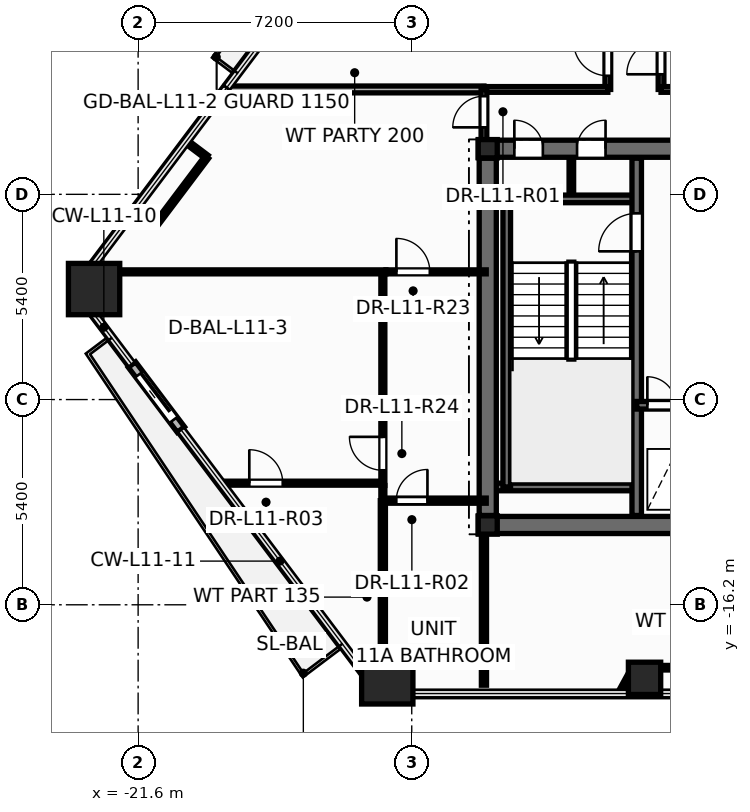
"""IFC4 building model, lengths in metres.
Left out: names, types, materials, properties, quantities, classifications, styles, units other than length and angle.
Written with IfcOpenShell. Run it as: python <this file> out.ifc"""

import sys

from ifc_helpers import new_model, si_unit, direction, frame, frame_2d, origin, origin_2d, place, context, subcontext, project, spatial, rectangle, hollow_rectangle, hollow_circle, i_section, extrude, element, fill, save


model = new_model("IFC4")
c1 = context("Model", 3, precision=1e-05, world=origin(), true_north=direction((0.0, 1.0)))
c2 = subcontext(c1, "Body", "Model", "MODEL_VIEW")
j1 = project(units=[si_unit("LENGTHUNIT", "METRE"), si_unit("PLANEANGLEUNIT", "RADIAN")], contexts=[c1])
p1 = place(None, origin())
s1 = spatial("IfcSite", under=j1, at=p1, CompositionType="ELEMENT")
p2 = place(p1, origin())
s2 = spatial("IfcBuilding", under=s1, at=p2, CompositionType="ELEMENT")
p3 = place(p2, frame((0.0, 0.0, 45.9)))
s3 = spatial("IfcBuildingStorey", under=s2, at=p3, CompositionType="ELEMENT", Elevation=45.9)
for number, where, z_axis, x_axis in (
    (1, (-22.759, -7.892, 0.0), (0.0, 0.0, 1.0), (1.0, 0.0, 0.0)),
    (2, (-15.044, -18.135, 0.0), (0.0, 0.0, 1.0), (1.0, 0.0, 0.0)),
):
    element("IfcColumn", number, at=place(p3, frame(where, z_axis=z_axis, x_axis=x_axis)), inside=s3, PredefinedType="COLUMN", context=c2, shape_type="SweptSolid", body=[
        extrude(hollow_rectangle(XDim=1.35, YDim=1.35, WallThickness=0.065, at=origin_2d()), origin(), (0.0, 0.0, 1.0), 3.6),
    ])
p4 = place(p3, frame((-8.274, -18.135, 0.0), z_axis=(0.0, 0.0, 1.0), x_axis=(1.0, 0.0, 0.0)))
e3 = element("IfcColumn", 3, at=p4, inside=s3, PredefinedType="COLUMN", context=c2, shape_type="SweptSolid", body=[
    extrude(hollow_circle(Radius=0.425, WallThickness=0.038, at=origin_2d()), origin(), (0.0, 0.0, 1.0), 3.6),
])
for number, where, z_axis, x_axis in (
    (4, (-12.4, -14.1, 0.0), (0.0, 0.0, 1.0), (1.0, 0.0, 0.0)),
    (5, (-12.4, -4.2, 0.0), (0.0, 0.0, 1.0), (1.0, 0.0, 0.0)),
):
    element("IfcColumn", number, at=place(p3, frame(where, z_axis=z_axis, x_axis=x_axis)), inside=s3, PredefinedType="COLUMN", context=c2, shape_type="SweptSolid", body=[
        extrude(i_section(OverallWidth=0.5, OverallDepth=0.482, WebThickness=0.04, FlangeThickness=0.045, at=origin_2d()), origin(), (0.0, 0.0, 1.0), 3.6),
    ])
p5 = place(p3, frame((-21.763, -9.88, -0.015), z_axis=(0.0, 0.0, 1.0), x_axis=(0.601568650406, -0.79882110566, 0.0)))
e6 = element("IfcWall", 6, at=p5, inside=s3, PredefinedType="STANDARD", context=c2, shape_type="SweptSolid", body=[
    extrude(rectangle(XDim=2.14, YDim=0.24, at=frame_2d((1.07, 0.0))), origin(), (0.0, 0.0, 1.0), 2.728),
])
p6 = place(p5, frame((0.32, 0.0, 0.015)))
e7 = element("IfcOpeningElement", 7, at=p6, cuts=e6, PredefinedType="OPENING", context=c2, shape_type="SweptSolid", body=[
    extrude(rectangle(XDim=1.506, YDim=2.204, at=frame_2d((0.75, 1.102))), frame((0.0, 0.13, 0.0), z_axis=(0.0, -1.0, 0.0), x_axis=(1.0, 0.0, 0.0)), (0.0, 0.0, 1.0), 0.26),
])
p7 = place(p3, frame((-10.2, -5.52, 0.0), z_axis=(0.0, 0.0, 1.0), x_axis=(0.0, 1.0, 0.0)))
e8 = element("IfcWall", 8, at=p7, inside=s3, PredefinedType="PARTITIONING", context=c2, shape_type="SweptSolid", body=[
    extrude(rectangle(XDim=1.12, YDim=0.12, at=frame_2d((0.56, 0.0))), origin(), (0.0, 0.0, 1.0), 3.35),
])
p8 = place(p3, frame((-12.65, -14.1, 0.0), z_axis=(0.0, 0.0, 1.0), x_axis=(1.0, 0.0, 0.0)))
e9 = element("IfcWall", 9, at=p8, inside=s3, PredefinedType="SHEAR", context=c2, shape_type="SweptSolid", body=[
    extrude(rectangle(XDim=25.3, YDim=0.45, at=frame_2d((12.65, 0.0))), origin(), (0.0, 0.0, 1.0), 3.6),
])
p9 = place(p3, frame((-12.65, -4.2, 0.0), z_axis=(0.0, 0.0, 1.0), x_axis=(1.0, 0.0, 0.0)))
e10 = element("IfcWall", 10, at=p9, inside=s3, PredefinedType="SHEAR", context=c2, shape_type="SweptSolid", body=[
    extrude(rectangle(XDim=25.3, YDim=0.45, at=frame_2d((12.65, 0.0))), origin(), (0.0, 0.0, 1.0), 3.6),
])
p10 = place(p9, frame((0.95, 0.0, 0.0)))
e11 = element("IfcOpeningElement", 11, at=p10, cuts=e10, PredefinedType="OPENING", context=c2, shape_type="SweptSolid", body=[
    extrude(rectangle(XDim=0.756, YDim=2.054, at=frame_2d((0.375, 1.027))), frame((0.0, 0.235, 0.0), z_axis=(0.0, -1.0, 0.0), x_axis=(1.0, 0.0, 0.0)), (0.0, 0.0, 1.0), 0.47),
])
p11 = place(p9, frame((2.6, 0.0, 0.0)))
e12 = element("IfcOpeningElement", 12, at=p11, cuts=e10, PredefinedType="OPENING", context=c2, shape_type="SweptSolid", body=[
    extrude(rectangle(XDim=0.756, YDim=2.054, at=frame_2d((0.375, 1.027))), frame((0.0, 0.235, 0.0), z_axis=(0.0, -1.0, 0.0), x_axis=(1.0, 0.0, 0.0)), (0.0, 0.0, 1.0), 0.47),
])
p12 = place(p9, frame((21.85, 0.0, 0.0)))
e13 = element("IfcOpeningElement", 13, at=p12, cuts=e10, PredefinedType="OPENING", context=c2, shape_type="SweptSolid", body=[
    extrude(rectangle(XDim=0.756, YDim=2.054, at=frame_2d((0.375, 1.027))), frame((0.0, 0.235, 0.0), z_axis=(0.0, -1.0, 0.0), x_axis=(1.0, 0.0, 0.0)), (0.0, 0.0, 1.0), 0.47),
])
p13 = place(p9, frame((23.5, 0.0, 0.0)))
e14 = element("IfcOpeningElement", 14, at=p13, cuts=e10, PredefinedType="OPENING", context=c2, shape_type="SweptSolid", body=[
    extrude(rectangle(XDim=0.756, YDim=2.054, at=frame_2d((0.375, 1.027))), frame((0.0, 0.235, 0.0), z_axis=(0.0, -1.0, 0.0), x_axis=(1.0, 0.0, 0.0)), (0.0, 0.0, 1.0), 0.47),
])
p14 = place(p9, frame((5.85, 0.0, 0.0)))
e15 = element("IfcOpeningElement", 15, at=p14, cuts=e10, PredefinedType="OPENING", context=c2, shape_type="SweptSolid", body=[
    extrude(rectangle(XDim=1.006, YDim=2.104, at=frame_2d((0.5, 1.052))), frame((0.0, 0.235, 0.0), z_axis=(0.0, -1.0, 0.0), x_axis=(1.0, 0.0, 0.0)), (0.0, 0.0, 1.0), 0.47),
])
p15 = place(p9, frame((10.35, 0.0, 0.0)))
e16 = element("IfcOpeningElement", 16, at=p15, cuts=e10, PredefinedType="OPENING", context=c2, shape_type="SweptSolid", body=[
    extrude(rectangle(XDim=1.406, YDim=2.154, at=frame_2d((0.7, 1.077))), frame((0.0, 0.235, 0.0), z_axis=(0.0, -1.0, 0.0), x_axis=(1.0, 0.0, 0.0)), (0.0, 0.0, 1.0), 0.47),
])
p16 = place(p9, frame((18.45, 0.0, 0.0)))
e17 = element("IfcOpeningElement", 17, at=p16, cuts=e10, PredefinedType="OPENING", context=c2, shape_type="SweptSolid", body=[
    extrude(rectangle(XDim=1.006, YDim=2.104, at=frame_2d((0.5, 1.052))), frame((0.0, 0.235, 0.0), z_axis=(0.0, -1.0, 0.0), x_axis=(1.0, 0.0, 0.0)), (0.0, 0.0, 1.0), 0.47),
])
for number, where, z_axis, x_axis in (
    (18, (-12.35, -5.52, 0.0), (0.0, 0.0, 1.0), (1.0, 0.0, 0.0)),
    (19, (-12.35, -13.1, 0.0), (0.0, 0.0, 1.0), (1.0, 0.0, 0.0)),
):
    element("IfcWall", number, at=place(p3, frame(where, z_axis=z_axis, x_axis=x_axis)), inside=s3, PredefinedType="SOLIDWALL", context=c2, shape_type="SweptSolid", body=[
        extrude(rectangle(XDim=3.87, YDim=0.2, at=frame_2d((1.935, 0.0))), origin(), (0.0, 0.0, 1.0), 3.6),
    ])
p17 = place(p3, frame((-11.9, -13.1, 0.0), z_axis=(0.0, 0.0, 1.0), x_axis=(0.0, 1.0, 0.0)))
e20 = element("IfcWall", 20, at=p17, inside=s3, PredefinedType="SOLIDWALL", context=c2, shape_type="SweptSolid", body=[
    extrude(rectangle(XDim=7.58, YDim=0.2, at=frame_2d((3.79, 0.0))), origin(), (0.0, 0.0, 1.0), 3.6),
])
p18 = place(p3, frame((-8.48, -13.85, 0.0), z_axis=(0.0, 0.0, 1.0), x_axis=(0.0, 1.0, 0.0)))
e21 = element("IfcWall", 21, at=p18, inside=s3, PredefinedType="SHEAR", context=c2, shape_type="SweptSolid", body=[
    extrude(rectangle(XDim=9.4, YDim=0.25, at=frame_2d((4.7, 0.0))), origin(), (0.0, 0.0, 1.0), 3.6),
])
p19 = place(p18, frame((6.95, 0.0, 0.0)))
e22 = element("IfcOpeningElement", 22, at=p19, cuts=e21, PredefinedType="OPENING", context=c2, shape_type="SweptSolid", body=[
    extrude(rectangle(XDim=1.006, YDim=2.104, at=frame_2d((0.5, 1.052))), frame((0.0, 0.135, 0.0), z_axis=(0.0, -1.0, 0.0), x_axis=(1.0, 0.0, 0.0)), (0.0, 0.0, 1.0), 0.27),
])
p20 = place(p3, frame((-8.48, -10.95, 0.0), z_axis=(0.0, 0.0, 1.0), x_axis=(1.0, 0.0, 0.0)))
e23 = element("IfcWall", 23, at=p20, inside=s3, PredefinedType="SOLIDWALL", context=c2, shape_type="SweptSolid", body=[
    extrude(rectangle(XDim=3.36, YDim=0.2, at=frame_2d((1.68, 0.0))), origin(), (0.0, 0.0, 1.0), 3.6),
])
p21 = place(p20, frame((0.28, 0.0, 0.0)))
e24 = element("IfcOpeningElement", 24, at=p21, cuts=e23, PredefinedType="OPENING", context=c2, shape_type="SweptSolid", body=[
    extrude(rectangle(XDim=0.756, YDim=2.054, at=frame_2d((0.375, 1.027))), frame((0.0, 0.11, 0.0), z_axis=(0.0, -1.0, 0.0), x_axis=(1.0, 0.0, 0.0)), (0.0, 0.0, 1.0), 0.22),
])
p22 = place(p20, frame((1.85, 0.0, 0.0)))
e25 = element("IfcOpeningElement", 25, at=p22, cuts=e23, PredefinedType="OPENING", context=c2, shape_type="SweptSolid", body=[
    extrude(rectangle(XDim=1.106, YDim=2.104, at=frame_2d((0.55, 1.052))), frame((0.0, 0.11, 0.0), z_axis=(0.0, -1.0, 0.0), x_axis=(1.0, 0.0, 0.0)), (0.0, 0.0, 1.0), 0.22),
])
p23 = place(p3, frame((-12.4, -13.85, 0.0), z_axis=(0.0, 0.0, 1.0), x_axis=(0.0, 1.0, 0.0)))
e26 = element("IfcWall", 26, at=p23, inside=s3, PredefinedType="SHEAR", context=c2, shape_type="SweptSolid", body=[
    extrude(rectangle(XDim=9.4, YDim=0.45, at=frame_2d((4.7, 0.0))), origin(), (0.0, 0.0, 1.0), 3.6),
])
p24 = place(p3, frame((-9.24, -2.64, 0.0), z_axis=(0.0, 0.0, 1.0), x_axis=(0.0, 1.0, 0.0)))
e27 = element("IfcWall", 27, at=p24, inside=s3, PredefinedType="PARTITIONING", context=c2, shape_type="SweptSolid", body=[
    extrude(rectangle(XDim=8.84, YDim=0.15, at=frame_2d((4.42, 0.0))), origin(), (0.0, 0.0, 1.0), 2.509),
])
p25 = place(p24, frame((0.359, 0.0, 0.0)))
e28 = element("IfcOpeningElement", 28, at=p25, cuts=e27, PredefinedType="OPENING", context=c2, shape_type="SweptSolid", body=[
    extrude(rectangle(XDim=0.906, YDim=2.104, at=frame_2d((0.45, 1.052))), frame((0.0, 0.085, 0.0), z_axis=(0.0, -1.0, 0.0), x_axis=(1.0, 0.0, 0.0)), (0.0, 0.0, 1.0), 0.17),
])
p26 = place(p3, frame((-22.919, -7.44, 0.0), z_axis=(0.0, 0.0, 1.0), x_axis=(1.0, 0.0, 0.0)))
e29 = element("IfcWall", 29, at=p26, inside=s3, PredefinedType="PARTITIONING", context=c2, shape_type="SweptSolid", body=[
    extrude(rectangle(XDim=7.839, YDim=0.105, at=frame_2d((3.919, 0.0))), origin(), (0.0, 0.0, 1.0), 2.325),
])
p27 = place(p3, frame((-19.304, -2.64, 0.0), z_axis=(0.0, 0.0, 1.0), x_axis=(1.0, 0.0, 0.0)))
e30 = element("IfcWall", 30, at=p27, inside=s3, PredefinedType="PARTITIONING", context=c2, shape_type="SweptSolid", body=[
    extrude(rectangle(XDim=6.804, YDim=0.18, at=frame_2d((3.402, 0.0))), origin(), (0.0, 0.0, 1.0), 2.713),
])
p28 = place(p3, frame((-15.16, -13.06, 0.0), z_axis=(0.0, 0.0, 1.0), x_axis=(0.0, 1.0, 0.0)))
e31 = element("IfcWall", 31, at=p28, inside=s3, PredefinedType="PARTITIONING", context=c2, shape_type="SweptSolid", body=[
    extrude(rectangle(XDim=5.62, YDim=0.105, at=frame_2d((2.81, 0.0))), origin(), (0.0, 0.0, 1.0), 3.35),
])
p29 = place(p28, frame((0.399, 0.0, 0.0)))
e32 = element("IfcOpeningElement", 32, at=p29, cuts=e31, PredefinedType="OPENING", context=c2, shape_type="SweptSolid", body=[
    extrude(rectangle(XDim=0.886, YDim=2.104, at=frame_2d((0.44, 1.052))), frame((0.0, 0.062, 0.0), z_axis=(0.0, -1.0, 0.0), x_axis=(1.0, 0.0, 0.0)), (0.0, 0.0, 1.0), 0.125),
])
p30 = place(p3, frame((-15.16, -18.536, 0.0), z_axis=(0.0, 0.0, 1.0), x_axis=(0.0, 1.0, 0.0)))
e33 = element("IfcWall", 33, at=p30, inside=s3, PredefinedType="PARTITIONING", context=c2, shape_type="SweptSolid", body=[
    extrude(rectangle(XDim=5.076, YDim=0.135, at=frame_2d((2.538, 0.0))), origin(), (0.0, 0.0, 1.0), 2.713),
])
p31 = place(p3, frame((-7.84, -2.64, 0.0), z_axis=(0.0, 0.0, 1.0), x_axis=(0.0, 1.0, 0.0)))
e34 = element("IfcWall", 34, at=p31, inside=s3, PredefinedType="PARTITIONING", context=c2, shape_type="SweptSolid", body=[
    extrude(rectangle(XDim=4.84, YDim=0.15, at=frame_2d((2.42, 0.0))), origin(), (0.0, 0.0, 1.0), 2.509),
])
p32 = place(p31, frame((0.398, 0.0, 0.0)))
e35 = element("IfcOpeningElement", 35, at=p32, cuts=e34, PredefinedType="OPENING", context=c2, shape_type="SweptSolid", body=[
    extrude(rectangle(XDim=0.906, YDim=2.104, at=frame_2d((0.45, 1.052))), frame((0.0, 0.085, 0.0), z_axis=(0.0, -1.0, 0.0), x_axis=(1.0, 0.0, 0.0)), (0.0, 0.0, 1.0), 0.17),
])
p33 = place(p3, frame((-7.84, -2.64, 0.0), z_axis=(0.0, 0.0, 1.0), x_axis=(1.0, 0.0, 0.0)))
e36 = element("IfcWall", 36, at=p33, inside=s3, PredefinedType="PARTITIONING", context=c2, shape_type="SweptSolid", body=[
    extrude(rectangle(XDim=7.0, YDim=0.15, at=frame_2d((3.5, 0.0))), origin(), (0.0, 0.0, 1.0), 2.325),
])
p34 = place(p3, frame((-19.413, -13.0, 0.0), z_axis=(0.0, 0.0, 1.0), x_axis=(1.0, 0.0, 0.0)))
e37 = element("IfcWall", 37, at=p34, inside=s3, PredefinedType="PARTITIONING", context=c2, shape_type="SweptSolid", body=[
    extrude(rectangle(XDim=4.253, YDim=0.105, at=frame_2d((2.126, 0.0))), origin(), (0.0, 0.0, 1.0), 2.713),
])
p35 = place(p34, frame((0.739, 0.0, 0.0)))
e38 = element("IfcOpeningElement", 38, at=p35, cuts=e37, PredefinedType="OPENING", context=c2, shape_type="SweptSolid", body=[
    extrude(rectangle(XDim=0.886, YDim=2.104, at=frame_2d((0.44, 1.052))), frame((0.0, 0.062, 0.0), z_axis=(0.0, -1.0, 0.0), x_axis=(1.0, 0.0, 0.0)), (0.0, 0.0, 1.0), 0.125),
])
p36 = place(p3, frame((-8.556, -17.856, 0.0), z_axis=(0.0, 0.0, 1.0), x_axis=(1.0, 0.0, 0.0)))
e39 = element("IfcWall", 39, at=p36, inside=s3, PredefinedType="PARTITIONING", context=c2, shape_type="SweptSolid", body=[
    extrude(rectangle(XDim=3.411, YDim=0.12, at=frame_2d((1.706, 0.0))), origin(), (0.0, 0.0, 1.0), 2.713),
])
p37 = place(p3, frame((-12.5, -2.64, 0.0), z_axis=(0.0, 0.0, 1.0), x_axis=(1.0, 0.0, 0.0)))
e40 = element("IfcWall", 40, at=p37, inside=s3, PredefinedType="PARTITIONING", context=c2, shape_type="SweptSolid", body=[
    extrude(rectangle(XDim=3.26, YDim=0.15, at=frame_2d((1.63, 0.0))), origin(), (0.0, 0.0, 1.0), 3.35),
])
p38 = place(p3, frame((-15.078, -7.44, 0.0), z_axis=(0.0, 0.0, 1.0), x_axis=(1.0, 0.0, 0.0)))
e41 = element("IfcWall", 41, at=p38, inside=s3, PredefinedType="PARTITIONING", context=c2, shape_type="SweptSolid", body=[
    extrude(rectangle(XDim=2.638, YDim=0.105, at=frame_2d((1.319, 0.0))), origin(), (0.0, 0.0, 1.0), 2.713),
])
p39 = place(p38, frame((0.274, 0.0, 0.0)))
e42 = element("IfcOpeningElement", 42, at=p39, cuts=e41, PredefinedType="OPENING", context=c2, shape_type="SweptSolid", body=[
    extrude(rectangle(XDim=0.886, YDim=2.104, at=frame_2d((0.44, 1.052))), frame((0.0, 0.062, 0.0), z_axis=(0.0, -1.0, 0.0), x_axis=(1.0, 0.0, 0.0)), (0.0, 0.0, 1.0), 0.125),
])
p40 = place(p3, frame((-15.16, -13.46, 0.0), z_axis=(0.0, 0.0, 1.0), x_axis=(1.0, 0.0, 0.0)))
e43 = element("IfcWall", 43, at=p40, inside=s3, PredefinedType="PARTITIONING", context=c2, shape_type="SweptSolid", body=[
    extrude(rectangle(XDim=2.72, YDim=0.135, at=frame_2d((1.36, 0.0))), origin(), (0.0, 0.0, 1.0), 2.713),
])
p41 = place(p40, frame((0.353, 0.0, 0.0)))
e44 = element("IfcOpeningElement", 44, at=p41, cuts=e43, PredefinedType="OPENING", context=c2, shape_type="SweptSolid", body=[
    extrude(rectangle(XDim=0.826, YDim=2.104, at=frame_2d((0.41, 1.052))), frame((0.0, 0.078, 0.0), z_axis=(0.0, -1.0, 0.0), x_axis=(1.0, 0.0, 0.0)), (0.0, 0.0, 1.0), 0.155),
])
p42 = place(p3, frame((-19.793, -4.42, 0.0), z_axis=(0.0, 0.0, 1.0), x_axis=(-0.601604540601, -0.798794076548, 0.0)))
e45 = element("IfcWall", 45, at=p42, inside=s3, PredefinedType="PARTITIONING", context=c2, shape_type="SweptSolid", body=[
    extrude(rectangle(XDim=2.214, YDim=0.12, at=frame_2d((1.107, 0.0))), origin(), (0.0, 0.0, 1.0), 3.35),
])
p43 = place(p3, frame((-12.5, -4.24, 0.0), z_axis=(0.0, 0.0, 1.0), x_axis=(0.0, 1.0, 0.0)))
e46 = element("IfcWall", 46, at=p43, inside=s3, PredefinedType="PARTITIONING", context=c2, shape_type="SweptSolid", body=[
    extrude(rectangle(XDim=1.6, YDim=0.15, at=frame_2d((0.8, 0.0))), origin(), (0.0, 0.0, 1.0), 2.325),
])
p44 = place(p43, frame((0.602, 0.0, 0.0)))
e47 = element("IfcOpeningElement", 47, at=p44, cuts=e46, PredefinedType="OPENING", context=c2, shape_type="SweptSolid", body=[
    extrude(rectangle(XDim=0.826, YDim=2.104, at=frame_2d((0.41, 1.052))), frame((0.0, 0.085, 0.0), z_axis=(0.0, -1.0, 0.0), x_axis=(1.0, 0.0, 0.0)), (0.0, 0.0, 1.0), 0.17),
])
p45 = place(p3, frame((-21.125, -6.188, 0.0), z_axis=(0.0, 0.0, 1.0), x_axis=(-0.999744633781, -0.022597947373, 0.0)))
e48 = element("IfcWall", 48, at=p45, inside=s3, PredefinedType="PARTITIONING", context=c2, shape_type="SweptSolid", body=[
    extrude(rectangle(XDim=0.854, YDim=0.12, at=frame_2d((0.427, 0.0))), origin(), (0.0, 0.0, 1.0), 2.713),
])
p46 = place(p3, frame((-8.924, -18.526, 0.0), z_axis=(0.0, 0.0, 1.0), x_axis=(0.480888080126, 0.87678198795, 0.0)))
e49 = element("IfcWall", 49, at=p46, inside=s3, PredefinedType="PARTITIONING", context=c2, shape_type="SweptSolid", body=[
    extrude(rectangle(XDim=0.764, YDim=0.12, at=frame_2d((0.382, 0.0))), origin(), (0.0, 0.0, 1.0), 2.713),
])
p47 = place(p3, frame((-20.328, -4.017, 0.0), z_axis=(0.0, 0.0, 1.0), x_axis=(0.798949061571, -0.601398700544, 0.0)))
e50 = element("IfcWall", 50, at=p47, inside=s3, PredefinedType="PARTITIONING", context=c2, shape_type="SweptSolid", body=[
    extrude(rectangle(XDim=0.67, YDim=0.12, at=frame_2d((0.335, 0.0))), origin(), (0.0, 0.0, 1.0), 2.713),
])
p48 = place(p3, frame((-15.16, -13.46, 0.0), z_axis=(0.0, 0.0, 1.0), x_axis=(0.0, 1.0, 0.0)))
e51 = element("IfcWall", 51, at=p48, inside=s3, PredefinedType="PARTITIONING", context=c2, shape_type="SweptSolid", body=[
    extrude(rectangle(XDim=0.398, YDim=0.105, at=frame_2d((0.199, 0.0))), origin(), (0.0, 0.0, 1.0), 3.35),
])
p49 = place(p3, frame((-12.5, -14.4, 0.0), z_axis=(0.0, 0.0, 1.0), x_axis=(0.0, -1.0, 0.0)))
e52 = element("IfcWall", 52, at=p49, inside=s3, PredefinedType="PARTITIONING", context=c2, shape_type="SweptSolid", body=[
    extrude(rectangle(XDim=3.916, YDim=0.135, at=frame_2d((1.958, 0.0))), origin(), (0.0, 0.0, 1.0), 2.713),
])
p50 = place(p6, origin())
e53 = element("IfcDoor", 53, at=p50, inside=s3, OperationType="SLIDING_TO_RIGHT", PredefinedType="DOOR", context=c2, shape_type="SweptSolid", body=[
    extrude(rectangle(XDim=1.5, YDim=2.2, at=frame_2d((0.75, 1.1))), frame((0.0, 0.025, 0.0), z_axis=(0.0, -1.0, 0.0), x_axis=(1.0, 0.0, 0.0)), (0.0, 0.0, 1.0), 0.05),
])
fill(e7, e53)
p51 = place(p19, origin())
e54 = element("IfcDoor", 54, at=p51, inside=s3, OperationType="SINGLE_SWING_LEFT", PredefinedType="DOOR", context=c2, shape_type="SweptSolid", body=[
    extrude(rectangle(XDim=1.0, YDim=2.1, at=frame_2d((0.5, 1.05))), frame((0.0, 0.025, 0.0), z_axis=(0.0, -1.0, 0.0), x_axis=(1.0, 0.0, 0.0)), (0.0, 0.0, 1.0), 0.05),
])
fill(e22, e54)
p52 = place(p21, origin())
e55 = element("IfcDoor", 55, at=p52, inside=s3, OperationType="SINGLE_SWING_LEFT", PredefinedType="DOOR", context=c2, shape_type="SweptSolid", body=[
    extrude(rectangle(XDim=0.75, YDim=2.05, at=frame_2d((0.375, 1.025))), frame((0.0, 0.025, 0.0), z_axis=(0.0, -1.0, 0.0), x_axis=(1.0, 0.0, 0.0)), (0.0, 0.0, 1.0), 0.05),
])
fill(e24, e55)
p53 = place(p10, origin())
e56 = element("IfcDoor", 56, at=p53, inside=s3, OperationType="SINGLE_SWING_LEFT", PredefinedType="DOOR", context=c2, shape_type="SweptSolid", body=[
    extrude(rectangle(XDim=0.75, YDim=2.05, at=frame_2d((0.375, 1.025))), frame((0.0, 0.025, 0.0), z_axis=(0.0, -1.0, 0.0), x_axis=(1.0, 0.0, 0.0)), (0.0, 0.0, 1.0), 0.05),
])
fill(e11, e56)
p54 = place(p11, origin())
e57 = element("IfcDoor", 57, at=p54, inside=s3, OperationType="SINGLE_SWING_RIGHT", PredefinedType="DOOR", context=c2, shape_type="SweptSolid", body=[
    extrude(rectangle(XDim=0.75, YDim=2.05, at=frame_2d((0.375, 1.025))), frame((0.0, 0.025, 0.0), z_axis=(0.0, -1.0, 0.0), x_axis=(1.0, 0.0, 0.0)), (0.0, 0.0, 1.0), 0.05),
])
fill(e12, e57)
p55 = place(p44, origin())
e58 = element("IfcDoor", 58, at=p55, inside=s3, OperationType="SINGLE_SWING_LEFT", PredefinedType="DOOR", context=c2, shape_type="SweptSolid", body=[
    extrude(rectangle(XDim=0.82, YDim=2.1, at=frame_2d((0.41, 1.05))), frame((0.0, 0.025, 0.0), z_axis=(0.0, -1.0, 0.0), x_axis=(1.0, 0.0, 0.0)), (0.0, 0.0, 1.0), 0.05),
])
fill(e47, e58)
p56 = place(p41, origin())
e59 = element("IfcDoor", 59, at=p56, inside=s3, OperationType="SINGLE_SWING_RIGHT", PredefinedType="DOOR", context=c2, shape_type="SweptSolid", body=[
    extrude(rectangle(XDim=0.82, YDim=2.1, at=frame_2d((0.41, 1.05))), frame((0.0, 0.025, 0.0), z_axis=(0.0, -1.0, 0.0), x_axis=(1.0, 0.0, 0.0)), (0.0, 0.0, 1.0), 0.05),
])
fill(e44, e59)
p57 = place(p35, origin())
e60 = element("IfcDoor", 60, at=p57, inside=s3, OperationType="SINGLE_SWING_LEFT", PredefinedType="DOOR", context=c2, shape_type="SweptSolid", body=[
    extrude(rectangle(XDim=0.88, YDim=2.1, at=frame_2d((0.44, 1.05))), frame((0.0, 0.025, 0.0), z_axis=(0.0, -1.0, 0.0), x_axis=(1.0, 0.0, 0.0)), (0.0, 0.0, 1.0), 0.05),
])
fill(e38, e60)
p58 = place(p25, origin())
e61 = element("IfcDoor", 61, at=p58, inside=s3, OperationType="SINGLE_SWING_RIGHT", PredefinedType="DOOR", context=c2, shape_type="SweptSolid", body=[
    extrude(rectangle(XDim=0.9, YDim=2.1, at=frame_2d((0.45, 1.05))), frame((0.0, 0.025, 0.0), z_axis=(0.0, -1.0, 0.0), x_axis=(1.0, 0.0, 0.0)), (0.0, 0.0, 1.0), 0.05),
])
fill(e28, e61)
p59 = place(p32, origin())
e62 = element("IfcDoor", 62, at=p59, inside=s3, OperationType="SINGLE_SWING_LEFT", PredefinedType="DOOR", context=c2, shape_type="SweptSolid", body=[
    extrude(rectangle(XDim=0.9, YDim=2.1, at=frame_2d((0.45, 1.05))), frame((0.0, 0.025, 0.0), z_axis=(0.0, -1.0, 0.0), x_axis=(1.0, 0.0, 0.0)), (0.0, 0.0, 1.0), 0.05),
])
fill(e35, e62)
p60 = place(p39, origin())
e63 = element("IfcDoor", 63, at=p60, inside=s3, OperationType="SINGLE_SWING_LEFT", PredefinedType="DOOR", context=c2, shape_type="SweptSolid", body=[
    extrude(rectangle(XDim=0.88, YDim=2.1, at=frame_2d((0.44, 1.05))), frame((0.0, 0.025, 0.0), z_axis=(0.0, -1.0, 0.0), x_axis=(1.0, 0.0, 0.0)), (0.0, 0.0, 1.0), 0.05),
])
fill(e42, e63)
p61 = place(p29, origin())
e64 = element("IfcDoor", 64, at=p61, inside=s3, OperationType="SINGLE_SWING_RIGHT", PredefinedType="DOOR", context=c2, shape_type="SweptSolid", body=[
    extrude(rectangle(XDim=0.88, YDim=2.1, at=frame_2d((0.44, 1.05))), frame((0.0, 0.025, 0.0), z_axis=(0.0, -1.0, 0.0), x_axis=(1.0, 0.0, 0.0)), (0.0, 0.0, 1.0), 0.05),
])
fill(e32, e64)
save(model, sys.argv[1])
